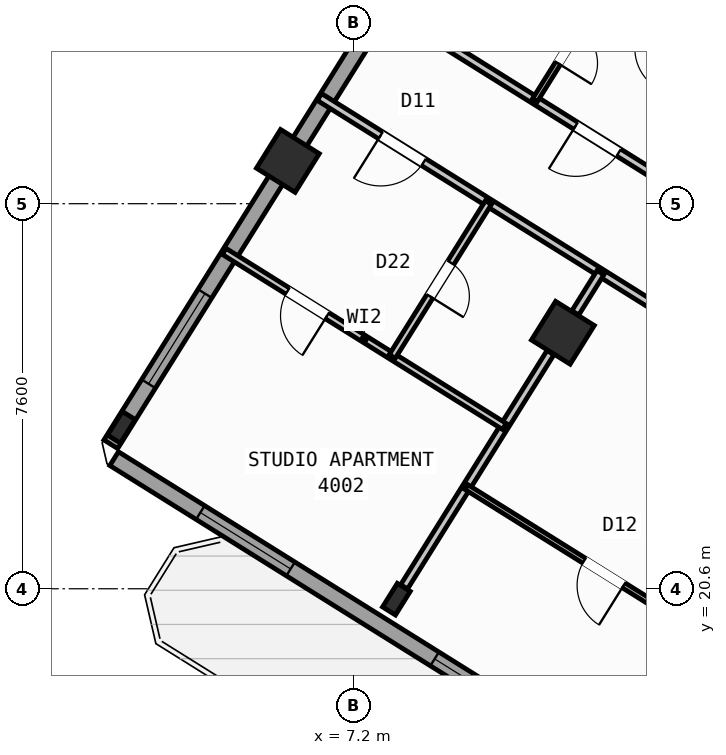
"""IFC4 building model, lengths in metres.
Left out: names, types, materials, properties, quantities, classifications, styles, units other than length and angle.
Written with IfcOpenShell. Run it as: python <this file> out.ifc"""

import sys

from ifc_helpers import new_model, si_unit, direction, frame, frame_2d, origin, origin_2d, place, context, subcontext, project, spatial, rectangle, hollow_rectangle, i_section, extrude, source, transform, mapped, element, fill, save


model = new_model("IFC4")
c1 = context("Model", 3, precision=1e-05, world=origin(), true_north=direction((0.0, 1.0)))
c2 = subcontext(c1, "Body", "Model", "MODEL_VIEW")
j1 = project(units=[si_unit("LENGTHUNIT", "METRE"), si_unit("PLANEANGLEUNIT", "RADIAN")], contexts=[c1])
p1 = place(None, origin())
s1 = spatial("IfcSite", under=j1, at=p1, CompositionType="ELEMENT")
p2 = place(p1, origin())
s2 = spatial("IfcBuilding", under=s1, at=p2, CompositionType="ELEMENT")
p3 = place(p2, frame((0.0, 0.0, 158.7)))
s3 = spatial("IfcBuildingStorey", under=s2, at=p3, CompositionType="ELEMENT", Elevation=158.7)
m1 = source(origin(), c2, "Body", "SweptSolid", [
    extrude(hollow_rectangle(XDim=0.9, YDim=0.9, WallThickness=0.036, at=origin_2d()), origin(), (0.0, 0.0, 1.0), 3.6),
])
p4 = place(p3, frame((11.336, 25.653, 0.0), z_axis=(0.0, 0.0, 1.0), x_axis=(-0.848048096156, 0.529919264233, 0.0)))
e1 = element("IfcColumn", 1, at=p4, inside=s3, PredefinedType="COLUMN", context=c2, shape_type="MappedRepresentation", body=[
    mapped(m1, transform((0.0, 0.0, 0.0), scale=1.0)),
])
m2 = source(origin(), c2, "Body", "SweptSolid", [
    extrude(i_section(OverallWidth=0.3, OverallDepth=0.55, WebThickness=0.015, FlangeThickness=0.029, at=origin_2d()), origin(), (0.0, 0.0, 1.0), 3.6),
])
p5 = place(p3, frame((8.051, 20.395, 0.0), z_axis=(0.0, 0.0, 1.0), x_axis=(-0.848048096156, 0.529919264233, 0.0)))
e2 = element("IfcColumn", 2, at=p5, inside=s3, PredefinedType="COLUMN", context=c2, shape_type="MappedRepresentation", body=[
    mapped(m2, transform((0.0, 0.0, 0.0), scale=1.0)),
])
p6 = place(p3, frame((5.909, 29.044, 0.0), z_axis=(0.0, 0.0, 1.0), x_axis=(-0.848048096156, 0.529919264233, 0.0)))
e3 = element("IfcColumn", 3, at=p6, inside=s3, PredefinedType="COLUMN", context=c2, shape_type="MappedRepresentation", body=[
    mapped(m1, transform((0.0, 0.0, 0.0), scale=1.0)),
])
p7 = place(p3, frame((2.623, 23.786, 0.0), z_axis=(0.0, 0.0, 1.0), x_axis=(-0.848048096156, 0.529919264233, 0.0)))
e4 = element("IfcColumn", 4, at=p7, inside=s3, PredefinedType="COLUMN", context=c2, shape_type="MappedRepresentation", body=[
    mapped(m2, transform((0.0, 0.0, 0.0), scale=1.0)),
])
p8 = place(p3, frame((29.268, 6.429, 0.0), z_axis=(0.0, 0.0, 1.0), x_axis=(-0.848049971435, 0.529916263149, 0.0)))
e5 = element("IfcWall", 5, at=p8, inside=s3, PredefinedType="STANDARD", context=c2, shape_type="SweptSolid", body=[
    extrude(rectangle(XDim=31.588, YDim=0.32, at=frame_2d((15.794, 0.0))), origin(), (0.0, 0.0, 1.0), 3.35),
])
p9 = place(p8, frame((16.362, 0.0, 0.0)))
e6 = element("IfcOpeningElement", 6, at=p9, cuts=e5, PredefinedType="OPENING", context=c2, shape_type="SweptSolid", body=[
    extrude(rectangle(XDim=1.2, YDim=2.15, at=frame_2d((0.6, 1.075))), frame((0.0, 0.17, 0.0), z_axis=(0.0, -1.0, 0.0), x_axis=(1.0, 0.0, 0.0)), (0.0, 0.0, 1.0), 0.34),
])
p10 = place(p8, frame((2.989, 0.0, 0.8)))
e7 = element("IfcOpeningElement", 7, at=p10, cuts=e5, PredefinedType="OPENING", context=c2, shape_type="SweptSolid", body=[
    extrude(rectangle(XDim=2.1, YDim=1.55, at=frame_2d((1.05, 0.775))), frame((0.0, 0.17, 0.0), z_axis=(0.0, -1.0, 0.0), x_axis=(1.0, 0.0, 0.0)), (0.0, 0.0, 1.0), 0.34),
])
p11 = place(p8, frame((8.359, 0.0, 0.8)))
e8 = element("IfcOpeningElement", 8, at=p11, cuts=e5, PredefinedType="OPENING", context=c2, shape_type="SweptSolid", body=[
    extrude(rectangle(XDim=2.1, YDim=1.55, at=frame_2d((1.05, 0.775))), frame((0.0, 0.17, 0.0), z_axis=(0.0, -1.0, 0.0), x_axis=(1.0, 0.0, 0.0)), (0.0, 0.0, 1.0), 0.34),
])
p12 = place(p8, frame((13.284, 0.0, 0.95)))
e9 = element("IfcOpeningElement", 9, at=p12, cuts=e5, PredefinedType="OPENING", context=c2, shape_type="SweptSolid", body=[
    extrude(rectangle(XDim=1.2, YDim=1.4, at=frame_2d((0.6, 0.7))), frame((0.0, 0.17, 0.0), z_axis=(0.0, -1.0, 0.0), x_axis=(1.0, 0.0, 0.0)), (0.0, 0.0, 1.0), 0.34),
])
p13 = place(p8, frame((20.259, 0.0, 0.95)))
e10 = element("IfcOpeningElement", 10, at=p13, cuts=e5, PredefinedType="OPENING", context=c2, shape_type="SweptSolid", body=[
    extrude(rectangle(XDim=1.2, YDim=1.4, at=frame_2d((0.6, 0.7))), frame((0.0, 0.17, 0.0), z_axis=(0.0, -1.0, 0.0), x_axis=(1.0, 0.0, 0.0)), (0.0, 0.0, 1.0), 0.34),
])
p14 = place(p8, frame((22.929, 0.0, 0.95)))
e11 = element("IfcOpeningElement", 11, at=p14, cuts=e5, PredefinedType="OPENING", context=c2, shape_type="SweptSolid", body=[
    extrude(rectangle(XDim=1.2, YDim=1.4, at=frame_2d((0.6, 0.7))), frame((0.0, 0.17, 0.0), z_axis=(0.0, -1.0, 0.0), x_axis=(1.0, 0.0, 0.0)), (0.0, 0.0, 1.0), 0.34),
])
p15 = place(p8, frame((27.481, 0.0, 0.8)))
e12 = element("IfcOpeningElement", 12, at=p15, cuts=e5, PredefinedType="OPENING", context=c2, shape_type="SweptSolid", body=[
    extrude(rectangle(XDim=2.1, YDim=1.55, at=frame_2d((1.05, 0.775))), frame((0.0, 0.17, 0.0), z_axis=(0.0, -1.0, 0.0), x_axis=(1.0, 0.0, 0.0)), (0.0, 0.0, 1.0), 0.34),
])
p16 = place(p3, frame((2.415, 23.452, 0.0), z_axis=(0.0, 0.0, 1.0), x_axis=(0.52991049553, 0.848053575387, 0.0)))
e13 = element("IfcWall", 13, at=p16, inside=s3, PredefinedType="STANDARD", context=c2, shape_type="SweptSolid", body=[
    extrude(rectangle(XDim=21.587, YDim=0.32, at=frame_2d((10.794, 0.0))), origin(), (0.0, 0.0, 1.0), 2.775),
])
p17 = place(p16, frame((1.406, 0.0, 0.8)))
e14 = element("IfcOpeningElement", 14, at=p17, cuts=e13, PredefinedType="OPENING", context=c2, shape_type="SweptSolid", body=[
    extrude(rectangle(XDim=2.1, YDim=1.55, at=frame_2d((1.05, 0.775))), frame((0.0, 0.17, 0.0), z_axis=(0.0, -1.0, 0.0), x_axis=(1.0, 0.0, 0.0)), (0.0, 0.0, 1.0), 0.34),
])
p18 = place(p16, frame((10.949, 0.0, 1.0)))
e15 = element("IfcOpeningElement", 15, at=p18, cuts=e13, PredefinedType="OPENING", context=c2, shape_type="SweptSolid", body=[
    extrude(rectangle(XDim=0.9, YDim=1.25, at=frame_2d((0.45, 0.625))), frame((0.0, 0.17, 0.0), z_axis=(0.0, -1.0, 0.0), x_axis=(1.0, 0.0, 0.0)), (0.0, 0.0, 1.0), 0.34),
])
p19 = place(p16, frame((15.369, 0.0, 0.85)))
e16 = element("IfcOpeningElement", 16, at=p19, cuts=e13, PredefinedType="OPENING", context=c2, shape_type="SweptSolid", body=[
    extrude(rectangle(XDim=1.5, YDim=1.5, at=frame_2d((0.75, 0.75))), frame((0.0, 0.17, 0.0), z_axis=(0.0, -1.0, 0.0), x_axis=(1.0, 0.0, 0.0)), (0.0, 0.0, 1.0), 0.34),
])
p20 = place(p16, frame((18.219, 0.0, 0.85)))
e17 = element("IfcOpeningElement", 17, at=p20, cuts=e13, PredefinedType="OPENING", context=c2, shape_type="SweptSolid", body=[
    extrude(rectangle(XDim=1.5, YDim=1.5, at=frame_2d((0.75, 0.75))), frame((0.0, 0.17, 0.0), z_axis=(0.0, -1.0, 0.0), x_axis=(1.0, 0.0, 0.0)), (0.0, 0.0, 1.0), 0.34),
])
p21 = place(p3, frame((21.885, 23.306, 0.0), z_axis=(0.0, 0.0, 1.0), x_axis=(-0.848052408131, 0.529912363569, 0.0)))
e18 = element("IfcWall", 18, at=p21, inside=s3, PredefinedType="PARTITIONING", context=c2, shape_type="SweptSolid", body=[
    extrude(rectangle(XDim=16.73, YDim=0.16, at=frame_2d((8.365, 0.0))), origin(), (0.0, 0.0, 1.0), 3.34),
])
p22 = place(p21, frame((1.395, 0.0, 0.0)))
e19 = element("IfcOpeningElement", 19, at=p22, cuts=e18, PredefinedType="OPENING", context=c2, shape_type="SweptSolid", body=[
    extrude(rectangle(XDim=1.0, YDim=2.1, at=frame_2d((0.5, 1.05))), frame((0.0, 0.09, 0.0), z_axis=(0.0, -1.0, 0.0), x_axis=(1.0, 0.0, 0.0)), (0.0, 0.0, 1.0), 0.18),
])
p23 = place(p21, frame((7.82, 0.0, 0.0)))
e20 = element("IfcOpeningElement", 20, at=p23, cuts=e18, PredefinedType="OPENING", context=c2, shape_type="SweptSolid", body=[
    extrude(rectangle(XDim=1.0, YDim=2.1, at=frame_2d((0.5, 1.05))), frame((0.0, 0.09, 0.0), z_axis=(0.0, -1.0, 0.0), x_axis=(1.0, 0.0, 0.0)), (0.0, 0.0, 1.0), 0.18),
])
p24 = place(p21, frame((11.14, 0.0, 0.0)))
e21 = element("IfcOpeningElement", 21, at=p24, cuts=e18, PredefinedType="OPENING", context=c2, shape_type="SweptSolid", body=[
    extrude(rectangle(XDim=1.0, YDim=2.1, at=frame_2d((0.5, 1.05))), frame((0.0, 0.09, 0.0), z_axis=(0.0, -1.0, 0.0), x_axis=(1.0, 0.0, 0.0)), (0.0, 0.0, 1.0), 0.18),
])
p25 = place(p3, frame((20.719, 21.44, 0.0), z_axis=(0.0, 0.0, 1.0), x_axis=(-0.848048310262, 0.529918921593, 0.0)))
e22 = element("IfcWall", 22, at=p25, inside=s3, PredefinedType="PARTITIONING", context=c2, shape_type="SweptSolid", body=[
    extrude(rectangle(XDim=16.73, YDim=0.16, at=frame_2d((8.365, 0.0))), origin(), (0.0, 0.0, 1.0), 3.34),
])
p26 = place(p25, frame((2.22, 0.0, 0.0)))
e23 = element("IfcOpeningElement", 23, at=p26, cuts=e22, PredefinedType="OPENING", context=c2, shape_type="SweptSolid", body=[
    extrude(rectangle(XDim=0.86, YDim=2.05, at=frame_2d((0.43, 1.025))), frame((0.0, 0.09, 0.0), z_axis=(0.0, -1.0, 0.0), x_axis=(1.0, 0.0, 0.0)), (0.0, 0.0, 1.0), 0.18),
])
p27 = place(p25, frame((6.49, 0.0, 0.0)))
e24 = element("IfcOpeningElement", 24, at=p27, cuts=e22, PredefinedType="OPENING", context=c2, shape_type="SweptSolid", body=[
    extrude(rectangle(XDim=1.0, YDim=2.1, at=frame_2d((0.5, 1.05))), frame((0.0, 0.09, 0.0), z_axis=(0.0, -1.0, 0.0), x_axis=(1.0, 0.0, 0.0)), (0.0, 0.0, 1.0), 0.18),
])
p28 = place(p25, frame((14.304, 0.0, 0.0)))
e25 = element("IfcOpeningElement", 25, at=p28, cuts=e22, PredefinedType="OPENING", context=c2, shape_type="SweptSolid", body=[
    extrude(rectangle(XDim=1.0, YDim=2.1, at=frame_2d((0.5, 1.05))), frame((0.0, 0.09, 0.0), z_axis=(0.0, -1.0, 0.0), x_axis=(1.0, 0.0, 0.0)), (0.0, 0.0, 1.0), 0.18),
])
p29 = place(p3, frame((12.078, 26.84, 0.0), z_axis=(0.0, 0.0, 1.0), x_axis=(-0.529952145338, -0.848027548876, 0.0)))
e26 = element("IfcWall", 26, at=p29, inside=s3, PredefinedType="PARTITIONING", context=c2, shape_type="SweptSolid", body=[
    extrude(rectangle(XDim=0.938, YDim=0.16, at=frame_2d((0.469, 0.0))), origin(), (0.0, 0.0, 1.0), 2.775),
])
p30 = place(p3, frame((11.091, 25.261, 0.0), z_axis=(0.0, 0.0, 1.0), x_axis=(-0.52994257524, -0.848033529377, 0.0)))
e27 = element("IfcWall", 27, at=p30, inside=s3, PredefinedType="PARTITIONING", context=c2, shape_type="SweptSolid", body=[
    extrude(rectangle(XDim=5.451, YDim=0.16, at=frame_2d((2.726, 0.0))), origin(), (0.0, 0.0, 1.0), 2.775),
])
p31 = place(p3, frame((14.86, 19.215, 0.0), z_axis=(0.0, 0.0, 1.0), x_axis=(-0.848039019877, 0.529933789039, 0.0)))
e28 = element("IfcWall", 28, at=p31, inside=s3, PredefinedType="PARTITIONING", context=c2, shape_type="SweptSolid", body=[
    extrude(rectangle(XDim=6.4, YDim=0.11, at=frame_2d((3.2, 0.0))), origin(), (0.0, 0.0, 1.0), 3.34),
])
p32 = place(p31, frame((2.74, 0.0, 0.0)))
e29 = element("IfcOpeningElement", 29, at=p32, cuts=e28, PredefinedType="OPENING", context=c2, shape_type="SweptSolid", body=[
    extrude(rectangle(XDim=0.92, YDim=2.08, at=frame_2d((0.46, 1.04))), frame((0.0, 0.065, 0.0), z_axis=(0.0, -1.0, 0.0), x_axis=(1.0, 0.0, 0.0)), (0.0, 0.0, 1.0), 0.13),
])
p33 = place(p3, frame((10.181, 23.804, 0.0), z_axis=(0.0, 0.0, 1.0), x_axis=(-0.848065614912, 0.529891227332, 0.0)))
e30 = element("IfcWall", 30, at=p33, inside=s3, PredefinedType="PLUMBINGWALL", context=c2, shape_type="SweptSolid", body=[
    extrude(rectangle(XDim=6.52, YDim=0.14, at=frame_2d((3.26, 0.0))), origin(), (0.0, 0.0, 1.0), 3.34),
])
p34 = place(p33, frame((4.124, 0.0, 0.0)))
e31 = element("IfcOpeningElement", 31, at=p34, cuts=e30, PredefinedType="OPENING", context=c2, shape_type="SweptSolid", body=[
    extrude(rectangle(XDim=0.92, YDim=2.08, at=frame_2d((0.46, 1.04))), frame((0.0, 0.08, 0.0), z_axis=(0.0, -1.0, 0.0), x_axis=(1.0, 0.0, 0.0)), (0.0, 0.0, 1.0), 0.16),
])
p35 = place(p3, frame((9.866, 28.222, 0.0), z_axis=(0.0, 0.0, 1.0), x_axis=(-0.529876336437, -0.84807491891, 0.0)))
e32 = element("IfcWall", 32, at=p35, inside=s3, PredefinedType="PLUMBINGWALL", context=c2, shape_type="SweptSolid", body=[
    extrude(rectangle(XDim=3.58, YDim=0.14, at=frame_2d((1.79, 0.0))), origin(), (0.0, 0.0, 1.0), 3.34),
])
p36 = place(p35, frame((1.4, 0.0, 0.0)))
e33 = element("IfcOpeningElement", 33, at=p36, cuts=e32, PredefinedType="OPENING", context=c2, shape_type="SweptSolid", body=[
    extrude(rectangle(XDim=0.78, YDim=2.05, at=frame_2d((0.39, 1.025))), frame((0.0, 0.08, 0.0), z_axis=(0.0, -1.0, 0.0), x_axis=(1.0, 0.0, 0.0)), (0.0, 0.0, 1.0), 0.16),
])
p37 = place(p3, frame((16.995, 40.182, 0.0), z_axis=(0.0, 0.0, 1.0), x_axis=(-0.529927783988, -0.848042772363, 0.0)))
e34 = element("IfcWall", 34, at=p37, inside=s3, PredefinedType="PARTITIONING", context=c2, shape_type="SweptSolid", body=[
    extrude(rectangle(XDim=11.72, YDim=0.11, at=frame_2d((5.86, 0.0))), origin(), (0.0, 0.0, 1.0), 3.34),
])
p38 = place(p37, frame((10.08, 0.0, 0.0)))
e35 = element("IfcOpeningElement", 35, at=p38, cuts=e34, PredefinedType="OPENING", context=c2, shape_type="SweptSolid", body=[
    extrude(rectangle(XDim=0.78, YDim=2.05, at=frame_2d((0.39, 1.025))), frame((0.0, 0.065, 0.0), z_axis=(0.0, -1.0, 0.0), x_axis=(1.0, 0.0, 0.0)), (0.0, 0.0, 1.0), 0.13),
])
p39 = place(p37, frame((4.2, 0.0, 0.0)))
e36 = element("IfcOpeningElement", 36, at=p39, cuts=e34, PredefinedType="OPENING", context=c2, shape_type="SweptSolid", body=[
    extrude(rectangle(XDim=0.92, YDim=2.08, at=frame_2d((0.46, 1.04))), frame((0.0, 0.065, 0.0), z_axis=(0.0, -1.0, 0.0), x_axis=(1.0, 0.0, 0.0)), (0.0, 0.0, 1.0), 0.13),
])
p40 = place(p3, frame((14.516, 30.741, 0.0), z_axis=(0.0, 0.0, 1.0), x_axis=(-0.848059786386, 0.529900555496, 0.0)))
e37 = element("IfcWall", 37, at=p40, inside=s3, PredefinedType="PLUMBINGWALL", context=c2, shape_type="SweptSolid", body=[
    extrude(rectangle(XDim=2.9, YDim=0.14, at=frame_2d((1.45, 0.0))), origin(), (0.0, 0.0, 1.0), 3.34),
])
p41 = place(p40, frame((0.99, 0.0, 0.0)))
e38 = element("IfcOpeningElement", 38, at=p41, cuts=e37, PredefinedType="OPENING", context=c2, shape_type="SweptSolid", body=[
    extrude(rectangle(XDim=0.92, YDim=2.08, at=frame_2d((0.46, 1.04))), frame((0.0, 0.08, 0.0), z_axis=(0.0, -1.0, 0.0), x_axis=(1.0, 0.0, 0.0)), (0.0, 0.0, 1.0), 0.16),
])
m3 = source(origin(), c2, "Body", "SweptSolid", [
    extrude(rectangle(XDim=1.2, YDim=1.4, at=frame_2d((0.6, 0.7))), frame((0.0, 0.03, 0.0), z_axis=(0.0, -1.0, 0.0), x_axis=(1.0, 0.0, 0.0)), (0.0, 0.0, 1.0), 0.06),
])
p42 = place(p14, origin())
e39 = element("IfcWindow", 39, at=p42, inside=s3, PartitioningType="SINGLE_PANEL", PredefinedType="WINDOW", context=c2, shape_type="MappedRepresentation", body=[
    mapped(m3, transform((0.0, 0.0, 0.0), scale=1.0)),
])
fill(e11, e39)
m4 = source(origin(), c2, "Body", "SweptSolid", [
    extrude(rectangle(XDim=2.1, YDim=1.55, at=frame_2d((1.05, 0.775))), frame((0.0, 0.03, 0.0), z_axis=(0.0, -1.0, 0.0), x_axis=(1.0, 0.0, 0.0)), (0.0, 0.0, 1.0), 0.06),
])
p43 = place(p15, origin())
e40 = element("IfcWindow", 40, at=p43, inside=s3, PartitioningType="SINGLE_PANEL", PredefinedType="WINDOW", context=c2, shape_type="MappedRepresentation", body=[
    mapped(m4, transform((0.0, 0.0, 0.0), scale=1.0)),
])
fill(e12, e40)
p44 = place(p17, origin())
e41 = element("IfcWindow", 41, at=p44, inside=s3, PartitioningType="SINGLE_PANEL", PredefinedType="WINDOW", context=c2, shape_type="MappedRepresentation", body=[
    mapped(m4, transform((0.0, 0.0, 0.0), scale=1.0)),
])
fill(e14, e41)
m5 = source(origin(), c2, "Body", "SweptSolid", [
    extrude(rectangle(XDim=0.92, YDim=2.08, at=frame_2d((0.46, 1.04))), frame((0.0, 0.025, 0.0), z_axis=(0.0, -1.0, 0.0), x_axis=(1.0, 0.0, 0.0)), (0.0, 0.0, 1.0), 0.05),
])
p45 = place(p32, origin())
e42 = element("IfcDoor", 42, at=p45, inside=s3, OperationType="SINGLE_SWING_LEFT", PredefinedType="DOOR", context=c2, shape_type="MappedRepresentation", body=[
    mapped(m5, transform((0.0, 0.0, 0.0), scale=1.0)),
])
fill(e29, e42)
m6 = source(origin(), c2, "Body", "SweptSolid", [
    extrude(rectangle(XDim=1.0, YDim=2.1, at=frame_2d((0.5, 1.05))), frame((0.0, 0.025, 0.0), z_axis=(0.0, -1.0, 0.0), x_axis=(1.0, 0.0, 0.0)), (0.0, 0.0, 1.0), 0.05),
])
p46 = place(p28, origin())
e43 = element("IfcDoor", 43, at=p46, inside=s3, OperationType="SINGLE_SWING_RIGHT", PredefinedType="DOOR", context=c2, shape_type="MappedRepresentation", body=[
    mapped(m6, transform((0.0, 0.0, 0.0), scale=1.0)),
])
fill(e25, e43)
p47 = place(p34, origin())
e44 = element("IfcDoor", 44, at=p47, inside=s3, OperationType="SINGLE_SWING_LEFT", PredefinedType="DOOR", context=c2, shape_type="MappedRepresentation", body=[
    mapped(m5, transform((0.0, 0.0, 0.0), scale=1.0)),
])
fill(e31, e44)
m7 = source(origin(), c2, "Body", "SweptSolid", [
    extrude(rectangle(XDim=0.78, YDim=2.05, at=frame_2d((0.39, 1.025))), frame((0.0, 0.025, 0.0), z_axis=(0.0, -1.0, 0.0), x_axis=(1.0, 0.0, 0.0)), (0.0, 0.0, 1.0), 0.05),
])
p48 = place(p36, origin())
e45 = element("IfcDoor", 45, at=p48, inside=s3, OperationType="SINGLE_SWING_RIGHT", PredefinedType="DOOR", context=c2, shape_type="MappedRepresentation", body=[
    mapped(m7, transform((0.0, 0.0, 0.0), scale=1.0)),
])
fill(e33, e45)
p49 = place(p24, origin())
e46 = element("IfcDoor", 46, at=p49, inside=s3, OperationType="SINGLE_SWING_RIGHT", PredefinedType="DOOR", context=c2, shape_type="MappedRepresentation", body=[
    mapped(m6, transform((0.0, 0.0, 0.0), scale=1.0)),
])
fill(e21, e46)
p50 = place(p38, origin())
e47 = element("IfcDoor", 47, at=p50, inside=s3, OperationType="SINGLE_SWING_RIGHT", PredefinedType="DOOR", context=c2, shape_type="MappedRepresentation", body=[
    mapped(m7, transform((0.0, 0.0, 0.0), scale=1.0)),
])
fill(e35, e47)
save(model, sys.argv[1])
